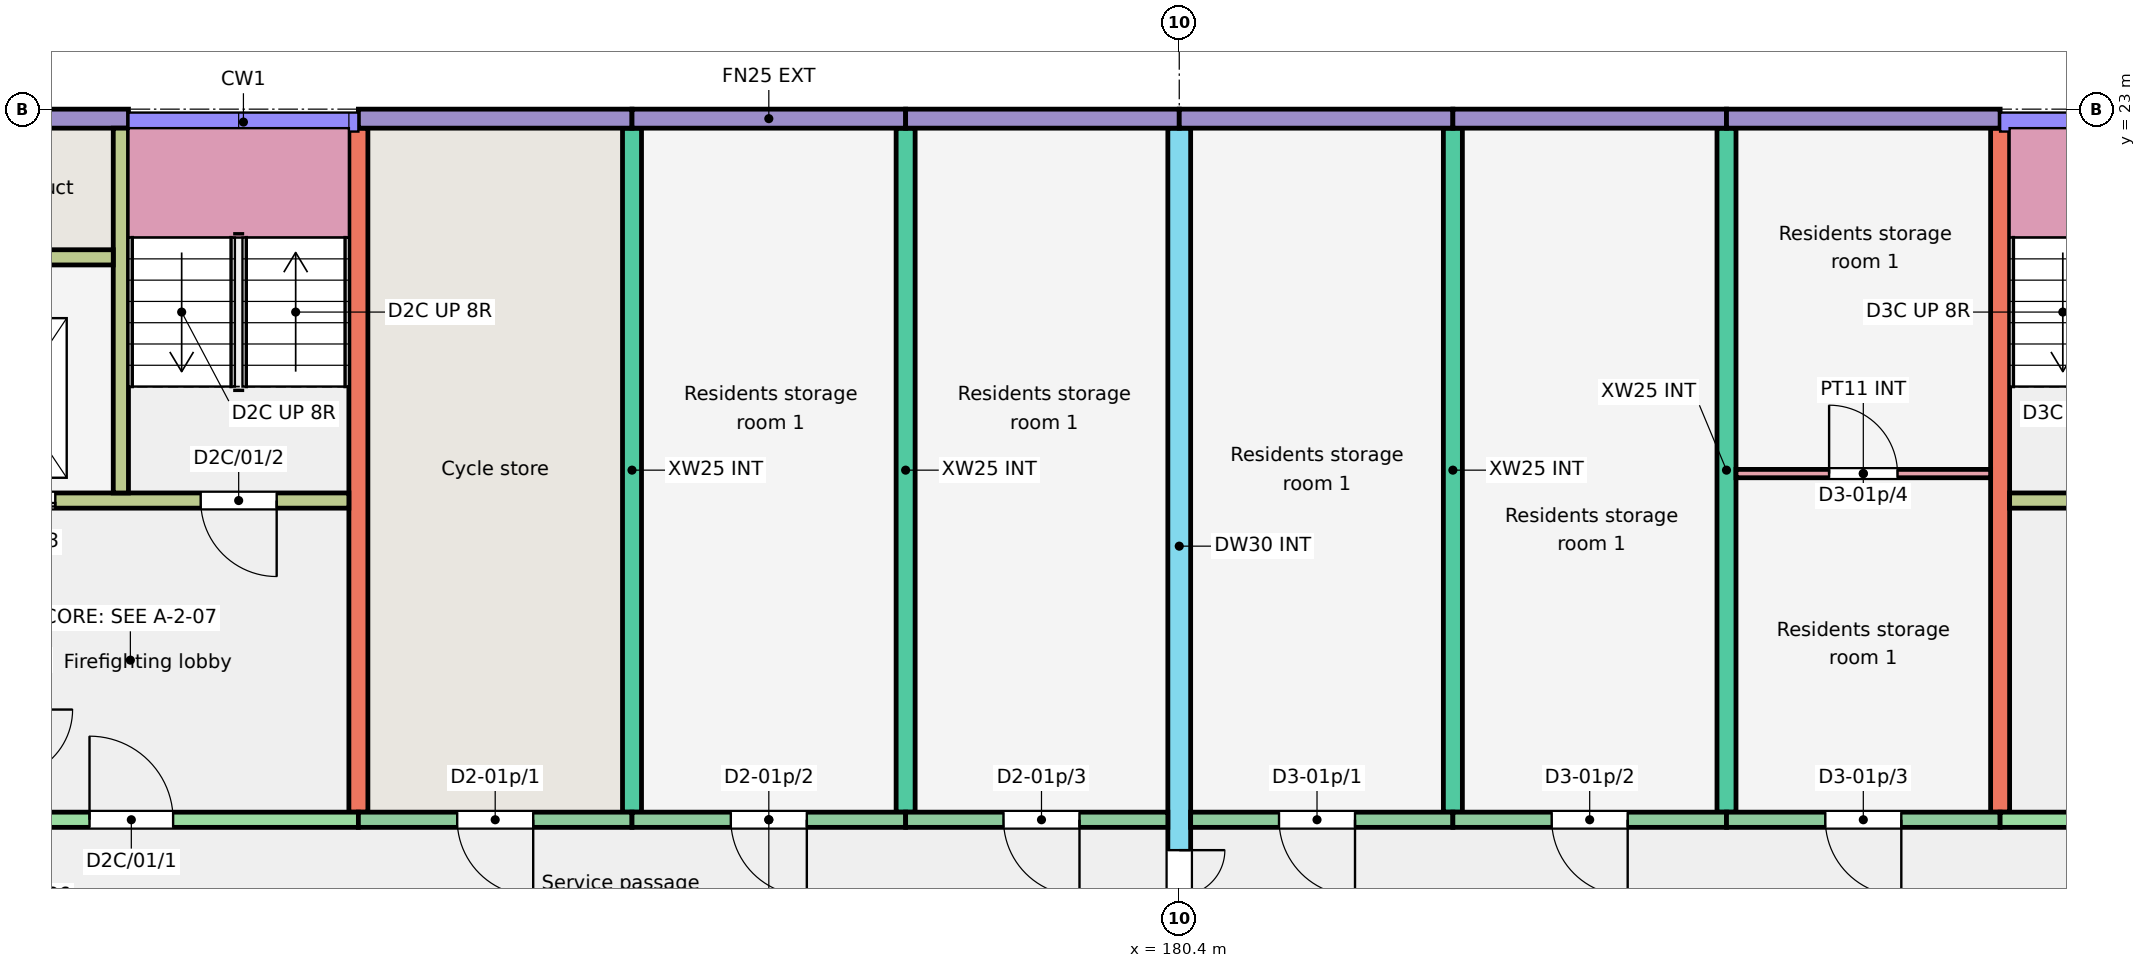
"""IFC4 building model, lengths in metres.
Left out: names, types, materials, properties, quantities, classifications, styles, units other than length and angle.
Written with IfcOpenShell. Run it as: python <this file> out.ifc"""

import sys

from ifc_helpers import new_model, si_unit, direction, frame, frame_2d, origin, place, context, subcontext, project, spatial, rectangle, extrude, element, fill, save


model = new_model("IFC4")
c1 = context("Model", 3, precision=1e-05, world=origin(), true_north=direction((0.0, 1.0)))
c2 = subcontext(c1, "Body", "Model", "MODEL_VIEW")
j1 = project(units=[si_unit("LENGTHUNIT", "METRE"), si_unit("PLANEANGLEUNIT", "RADIAN")], contexts=[c1])
p1 = place(None, origin())
s1 = spatial("IfcSite", under=j1, at=p1, CompositionType="ELEMENT")
p2 = place(p1, origin())
s2 = spatial("IfcBuilding", under=s1, at=p2, CompositionType="ELEMENT")
p3 = place(p2, frame((0.0, 0.0, 3.0)))
s3 = spatial("IfcBuildingStorey", under=s2, at=p3, CompositionType="ELEMENT", Elevation=3.0)
for number, where, z_axis, x_axis in (
    (1, (169.6, 13.75, 0.0), (0.0, 0.0, 1.0), (0.0, 1.0, 0.0)),
    (2, (173.2, 13.75, 0.0), (0.0, 0.0, 1.0), (0.0, 1.0, 0.0)),
    (3, (176.8, 13.75, 0.0), (0.0, 0.0, 1.0), (0.0, 1.0, 0.0)),
):
    element("IfcWall", number, at=place(p3, frame(where, z_axis=z_axis, x_axis=x_axis)), inside=s3, PredefinedType="SHEAR", context=c2, shape_type="SweptSolid", body=[
        extrude(rectangle(XDim=9.0, YDim=0.25, at=frame_2d((4.5, 0.0))), origin(), (0.0, 0.0, 1.0), 3.0),
    ])
p4 = place(p3, frame((180.4, 11.75, 0.0), z_axis=(0.0, 0.0, 1.0), x_axis=(0.0, 1.0, 0.0)))
e4 = element("IfcWall", 4, at=p4, inside=s3, PredefinedType="SHEAR", context=c2, shape_type="SweptSolid", body=[
    extrude(rectangle(XDim=11.0, YDim=0.3, at=frame_2d((5.5, 0.0))), origin(), (0.0, 0.0, 1.0), 3.0),
])
p5 = place(p4, frame((0.3, 0.0, 0.0)))
e5 = element("IfcOpeningElement", 5, at=p5, cuts=e4, PredefinedType="OPENING", context=c2, shape_type="SweptSolid", body=[
    extrude(rectangle(XDim=1.2, YDim=2.1, at=frame_2d((0.6, 1.05))), frame((0.0, 0.16, 0.0), z_axis=(0.0, -1.0, 0.0), x_axis=(1.0, 0.0, 0.0)), (0.0, 0.0, 1.0), 0.32),
])
for number, where, z_axis, x_axis in (
    (6, (184.0, 13.75, 0.0), (0.0, 0.0, 1.0), (0.0, 1.0, 0.0)),
    (7, (187.6, 13.75, 0.0), (0.0, 0.0, 1.0), (0.0, 1.0, 0.0)),
    (8, (191.2, 13.75, 0.0), (0.0, 0.0, 1.0), (0.0, 1.0, 0.0)),
):
    element("IfcWall", number, at=place(p3, frame(where, z_axis=z_axis, x_axis=x_axis)), inside=s3, PredefinedType="SHEAR", context=c2, shape_type="SweptSolid", body=[
        extrude(rectangle(XDim=9.0, YDim=0.25, at=frame_2d((4.5, 0.0))), origin(), (0.0, 0.0, 1.0), 3.0),
    ])
p6 = place(p3, frame((163.6, 22.875, 0.0), z_axis=(0.0, 0.0, 1.0), x_axis=(1.0, 0.0, 0.0)))
e9 = element("IfcWall", 9, at=p6, inside=s3, PredefinedType="SOLIDWALL", context=c2, shape_type="SweptSolid", body=[
    extrude(rectangle(XDim=2.975, YDim=0.25, at=frame_2d((1.487, 0.0))), origin(), (0.0, 0.0, 1.0), 3.0),
])
p7 = place(p3, frame((163.75, 13.65, 0.0), z_axis=(0.0, 0.0, 1.0), x_axis=(1.0, 0.0, 0.0)))
e10 = element("IfcWall", 10, at=p7, inside=s3, PredefinedType="SHEAR", context=c2, shape_type="SweptSolid", body=[
    extrude(rectangle(XDim=5.85, YDim=0.2, at=frame_2d((2.925, 0.0))), origin(), (0.0, 0.0, 1.0), 3.0),
])
p8 = place(p7, frame((2.312, 0.0, 0.0)))
e11 = element("IfcOpeningElement", 11, at=p8, cuts=e10, PredefinedType="OPENING", context=c2, shape_type="SweptSolid", body=[
    extrude(rectangle(XDim=1.1, YDim=2.1, at=frame_2d((0.55, 1.05))), frame((0.0, 0.11, 0.0), z_axis=(0.0, -1.0, 0.0), x_axis=(1.0, 0.0, 0.0)), (0.0, 0.0, 1.0), 0.22),
])
p9 = place(p3, frame((163.75, 17.85, 0.0), z_axis=(0.0, 0.0, 1.0), x_axis=(1.0, 0.0, 0.0)))
e12 = element("IfcWall", 12, at=p9, inside=s3, PredefinedType="SHEAR", context=c2, shape_type="SweptSolid", body=[
    extrude(rectangle(XDim=5.725, YDim=0.2, at=frame_2d((2.863, 0.0))), origin(), (0.0, 0.0, 1.0), 3.0),
])
p10 = place(p9, frame((3.775, 0.0, 0.0)))
e13 = element("IfcOpeningElement", 13, at=p10, cuts=e12, PredefinedType="OPENING", context=c2, shape_type="SweptSolid", body=[
    extrude(rectangle(XDim=1.0, YDim=2.1, at=frame_2d((0.5, 1.05))), frame((0.0, 0.11, 0.0), z_axis=(0.0, -1.0, 0.0), x_axis=(1.0, 0.0, 0.0)), (0.0, 0.0, 1.0), 0.22),
])
p11 = place(p9, frame((0.762, 0.0, 0.0)))
e14 = element("IfcOpeningElement", 14, at=p11, cuts=e12, PredefinedType="OPENING", context=c2, shape_type="SweptSolid", body=[
    extrude(rectangle(XDim=1.1, YDim=2.1, at=frame_2d((0.55, 1.05))), frame((0.0, 0.11, 0.0), z_axis=(0.0, -1.0, 0.0), x_axis=(1.0, 0.0, 0.0)), (0.0, 0.0, 1.0), 0.22),
])
p12 = place(p3, frame((166.475, 17.95, 0.0), z_axis=(0.0, 0.0, 1.0), x_axis=(0.0, 1.0, 0.0)))
e15 = element("IfcWall", 15, at=p12, inside=s3, PredefinedType="SHEAR", context=c2, shape_type="SweptSolid", body=[
    extrude(rectangle(XDim=4.8, YDim=0.2, at=frame_2d((2.4, 0.0))), origin(), (0.0, 0.0, 1.0), 3.0),
])
p13 = place(p3, frame((163.75, 21.05, 0.0), z_axis=(0.0, 0.0, 1.0), x_axis=(1.0, 0.0, 0.0)))
e16 = element("IfcWall", 16, at=p13, inside=s3, PredefinedType="SHEAR", context=c2, shape_type="SweptSolid", body=[
    extrude(rectangle(XDim=2.625, YDim=0.2, at=frame_2d((1.312, 0.0))), origin(), (0.0, 0.0, 1.0), 3.0),
])
p14 = place(p3, frame((169.6, 22.875, 0.0), z_axis=(0.0, 0.0, 1.0), x_axis=(1.0, 0.0, 0.0)))
e17 = element("IfcWall", 17, at=p14, inside=s3, PredefinedType="SOLIDWALL", context=c2, shape_type="SweptSolid", body=[
    extrude(rectangle(XDim=3.6, YDim=0.25, at=frame_2d((1.8, 0.0))), origin(), (0.0, 0.0, 1.0), 3.0),
])
p15 = place(p3, frame((169.6, 13.65, 0.0), z_axis=(0.0, 0.0, 1.0), x_axis=(1.0, 0.0, 0.0)))
e18 = element("IfcWall", 18, at=p15, inside=s3, PredefinedType="SOLIDWALL", context=c2, shape_type="SweptSolid", body=[
    extrude(rectangle(XDim=3.6, YDim=0.2, at=frame_2d((1.8, 0.0))), origin(), (0.0, 0.0, 1.0), 3.0),
])
p16 = place(p15, frame((1.3, 0.0, 0.0)))
e19 = element("IfcOpeningElement", 19, at=p16, cuts=e18, PredefinedType="OPENING", context=c2, shape_type="SweptSolid", body=[
    extrude(rectangle(XDim=1.0, YDim=2.1, at=frame_2d((0.5, 1.05))), frame((0.0, 0.11, 0.0), z_axis=(0.0, -1.0, 0.0), x_axis=(1.0, 0.0, 0.0)), (0.0, 0.0, 1.0), 0.22),
])
p17 = place(p3, frame((173.2, 22.875, 0.0), z_axis=(0.0, 0.0, 1.0), x_axis=(1.0, 0.0, 0.0)))
e20 = element("IfcWall", 20, at=p17, inside=s3, PredefinedType="SOLIDWALL", context=c2, shape_type="SweptSolid", body=[
    extrude(rectangle(XDim=3.6, YDim=0.25, at=frame_2d((1.8, 0.0))), origin(), (0.0, 0.0, 1.0), 3.0),
])
p18 = place(p3, frame((173.2, 13.65, 0.0), z_axis=(0.0, 0.0, 1.0), x_axis=(1.0, 0.0, 0.0)))
e21 = element("IfcWall", 21, at=p18, inside=s3, PredefinedType="SOLIDWALL", context=c2, shape_type="SweptSolid", body=[
    extrude(rectangle(XDim=3.6, YDim=0.2, at=frame_2d((1.8, 0.0))), origin(), (0.0, 0.0, 1.0), 3.0),
])
p19 = place(p18, frame((1.3, 0.0, 0.0)))
e22 = element("IfcOpeningElement", 22, at=p19, cuts=e21, PredefinedType="OPENING", context=c2, shape_type="SweptSolid", body=[
    extrude(rectangle(XDim=1.0, YDim=2.1, at=frame_2d((0.5, 1.05))), frame((0.0, 0.11, 0.0), z_axis=(0.0, -1.0, 0.0), x_axis=(1.0, 0.0, 0.0)), (0.0, 0.0, 1.0), 0.22),
])
p20 = place(p3, frame((176.8, 22.875, 0.0), z_axis=(0.0, 0.0, 1.0), x_axis=(1.0, 0.0, 0.0)))
e23 = element("IfcWall", 23, at=p20, inside=s3, PredefinedType="SOLIDWALL", context=c2, shape_type="SweptSolid", body=[
    extrude(rectangle(XDim=3.6, YDim=0.25, at=frame_2d((1.8, 0.0))), origin(), (0.0, 0.0, 1.0), 3.0),
])
p21 = place(p3, frame((176.8, 13.65, 0.0), z_axis=(0.0, 0.0, 1.0), x_axis=(1.0, 0.0, 0.0)))
e24 = element("IfcWall", 24, at=p21, inside=s3, PredefinedType="SOLIDWALL", context=c2, shape_type="SweptSolid", body=[
    extrude(rectangle(XDim=3.45, YDim=0.2, at=frame_2d((1.725, 0.0))), origin(), (0.0, 0.0, 1.0), 3.0),
])
p22 = place(p21, frame((1.288, 0.0, 0.0)))
e25 = element("IfcOpeningElement", 25, at=p22, cuts=e24, PredefinedType="OPENING", context=c2, shape_type="SweptSolid", body=[
    extrude(rectangle(XDim=1.0, YDim=2.1, at=frame_2d((0.5, 1.05))), frame((0.0, 0.11, 0.0), z_axis=(0.0, -1.0, 0.0), x_axis=(1.0, 0.0, 0.0)), (0.0, 0.0, 1.0), 0.22),
])
p23 = place(p3, frame((180.4, 22.875, 0.0), z_axis=(0.0, 0.0, 1.0), x_axis=(1.0, 0.0, 0.0)))
e26 = element("IfcWall", 26, at=p23, inside=s3, PredefinedType="SOLIDWALL", context=c2, shape_type="SweptSolid", body=[
    extrude(rectangle(XDim=3.6, YDim=0.25, at=frame_2d((1.8, 0.0))), origin(), (0.0, 0.0, 1.0), 3.0),
])
p24 = place(p3, frame((180.55, 13.65, 0.0), z_axis=(0.0, 0.0, 1.0), x_axis=(1.0, 0.0, 0.0)))
e27 = element("IfcWall", 27, at=p24, inside=s3, PredefinedType="SOLIDWALL", context=c2, shape_type="SweptSolid", body=[
    extrude(rectangle(XDim=3.45, YDim=0.2, at=frame_2d((1.725, 0.0))), origin(), (0.0, 0.0, 1.0), 3.0),
])
p25 = place(p24, frame((1.163, 0.0, 0.0)))
e28 = element("IfcOpeningElement", 28, at=p25, cuts=e27, PredefinedType="OPENING", context=c2, shape_type="SweptSolid", body=[
    extrude(rectangle(XDim=1.0, YDim=2.1, at=frame_2d((0.5, 1.05))), frame((0.0, 0.11, 0.0), z_axis=(0.0, -1.0, 0.0), x_axis=(1.0, 0.0, 0.0)), (0.0, 0.0, 1.0), 0.22),
])
p26 = place(p3, frame((184.0, 22.875, 0.0), z_axis=(0.0, 0.0, 1.0), x_axis=(1.0, 0.0, 0.0)))
e29 = element("IfcWall", 29, at=p26, inside=s3, PredefinedType="SOLIDWALL", context=c2, shape_type="SweptSolid", body=[
    extrude(rectangle(XDim=3.6, YDim=0.25, at=frame_2d((1.8, 0.0))), origin(), (0.0, 0.0, 1.0), 3.0),
])
p27 = place(p3, frame((184.0, 13.65, 0.0), z_axis=(0.0, 0.0, 1.0), x_axis=(1.0, 0.0, 0.0)))
e30 = element("IfcWall", 30, at=p27, inside=s3, PredefinedType="SOLIDWALL", context=c2, shape_type="SweptSolid", body=[
    extrude(rectangle(XDim=3.6, YDim=0.2, at=frame_2d((1.8, 0.0))), origin(), (0.0, 0.0, 1.0), 3.0),
])
p28 = place(p27, frame((1.3, 0.0, 0.0)))
e31 = element("IfcOpeningElement", 31, at=p28, cuts=e30, PredefinedType="OPENING", context=c2, shape_type="SweptSolid", body=[
    extrude(rectangle(XDim=1.0, YDim=2.1, at=frame_2d((0.5, 1.05))), frame((0.0, 0.11, 0.0), z_axis=(0.0, -1.0, 0.0), x_axis=(1.0, 0.0, 0.0)), (0.0, 0.0, 1.0), 0.22),
])
p29 = place(p3, frame((187.6, 22.875, 0.0), z_axis=(0.0, 0.0, 1.0), x_axis=(1.0, 0.0, 0.0)))
e32 = element("IfcWall", 32, at=p29, inside=s3, PredefinedType="SOLIDWALL", context=c2, shape_type="SweptSolid", body=[
    extrude(rectangle(XDim=3.6, YDim=0.25, at=frame_2d((1.8, 0.0))), origin(), (0.0, 0.0, 1.0), 3.0),
])
p30 = place(p3, frame((187.6, 13.65, 0.0), z_axis=(0.0, 0.0, 1.0), x_axis=(1.0, 0.0, 0.0)))
e33 = element("IfcWall", 33, at=p30, inside=s3, PredefinedType="SOLIDWALL", context=c2, shape_type="SweptSolid", body=[
    extrude(rectangle(XDim=3.6, YDim=0.2, at=frame_2d((1.8, 0.0))), origin(), (0.0, 0.0, 1.0), 3.0),
])
p31 = place(p30, frame((1.3, 0.0, 0.0)))
e34 = element("IfcOpeningElement", 34, at=p31, cuts=e33, PredefinedType="OPENING", context=c2, shape_type="SweptSolid", body=[
    extrude(rectangle(XDim=1.0, YDim=2.1, at=frame_2d((0.5, 1.05))), frame((0.0, 0.11, 0.0), z_axis=(0.0, -1.0, 0.0), x_axis=(1.0, 0.0, 0.0)), (0.0, 0.0, 1.0), 0.22),
])
p32 = place(p3, frame((191.2, 13.65, 0.0), z_axis=(0.0, 0.0, 1.0), x_axis=(1.0, 0.0, 0.0)))
e35 = element("IfcWall", 35, at=p32, inside=s3, PredefinedType="SHEAR", context=c2, shape_type="SweptSolid", body=[
    extrude(rectangle(XDim=5.85, YDim=0.2, at=frame_2d((2.925, 0.0))), origin(), (0.0, 0.0, 1.0), 3.0),
])
p33 = place(p32, frame((2.438, 0.0, 0.0)))
e36 = element("IfcOpeningElement", 36, at=p33, cuts=e35, PredefinedType="OPENING", context=c2, shape_type="SweptSolid", body=[
    extrude(rectangle(XDim=1.1, YDim=2.1, at=frame_2d((0.55, 1.05))), frame((0.0, 0.11, 0.0), z_axis=(0.0, -1.0, 0.0), x_axis=(1.0, 0.0, 0.0)), (0.0, 0.0, 1.0), 0.22),
])
p34 = place(p3, frame((191.325, 17.85, 0.0), z_axis=(0.0, 0.0, 1.0), x_axis=(1.0, 0.0, 0.0)))
e37 = element("IfcWall", 37, at=p34, inside=s3, PredefinedType="SHEAR", context=c2, shape_type="SweptSolid", body=[
    extrude(rectangle(XDim=5.725, YDim=0.2, at=frame_2d((2.863, 0.0))), origin(), (0.0, 0.0, 1.0), 3.0),
])
p35 = place(p34, frame((0.95, 0.0, 0.0)))
e38 = element("IfcOpeningElement", 38, at=p35, cuts=e37, PredefinedType="OPENING", context=c2, shape_type="SweptSolid", body=[
    extrude(rectangle(XDim=1.0, YDim=2.1, at=frame_2d((0.5, 1.05))), frame((0.0, 0.11, 0.0), z_axis=(0.0, -1.0, 0.0), x_axis=(1.0, 0.0, 0.0)), (0.0, 0.0, 1.0), 0.22),
])
p36 = place(p34, frame((3.863, 0.0, 0.0)))
e39 = element("IfcOpeningElement", 39, at=p36, cuts=e37, PredefinedType="OPENING", context=c2, shape_type="SweptSolid", body=[
    extrude(rectangle(XDim=1.1, YDim=2.1, at=frame_2d((0.55, 1.05))), frame((0.0, 0.11, 0.0), z_axis=(0.0, -1.0, 0.0), x_axis=(1.0, 0.0, 0.0)), (0.0, 0.0, 1.0), 0.22),
])
p37 = place(p3, frame((187.725, 18.205, 0.0), z_axis=(0.0, 0.0, 1.0), x_axis=(1.0, 0.0, 0.0)))
e40 = element("IfcWall", 40, at=p37, inside=s3, PredefinedType="PARTITIONING", context=c2, shape_type="SweptSolid", body=[
    extrude(rectangle(XDim=3.35, YDim=0.11, at=frame_2d((1.675, 0.0))), origin(), (0.0, 0.0, 1.0), 2.8),
])
p38 = place(p37, frame((1.225, 0.0, 0.0)))
e41 = element("IfcOpeningElement", 41, at=p38, cuts=e40, PredefinedType="OPENING", context=c2, shape_type="SweptSolid", body=[
    extrude(rectangle(XDim=0.9, YDim=2.1, at=frame_2d((0.45, 1.05))), frame((0.0, 0.065, 0.0), z_axis=(0.0, -1.0, 0.0), x_axis=(1.0, 0.0, 0.0)), (0.0, 0.0, 1.0), 0.13),
])
p39 = place(p16, origin())
e42 = element("IfcDoor", 42, at=p39, inside=s3, OperationType="SINGLE_SWING_RIGHT", PredefinedType="DOOR", context=c2, shape_type="SweptSolid", body=[
    extrude(rectangle(XDim=1.0, YDim=2.1, at=frame_2d((0.5, 1.05))), frame((0.0, 0.025, 0.0), z_axis=(0.0, -1.0, 0.0), x_axis=(1.0, 0.0, 0.0)), (0.0, 0.0, 1.0), 0.05),
])
fill(e19, e42)
p40 = place(p19, origin())
e43 = element("IfcDoor", 43, at=p40, inside=s3, OperationType="SINGLE_SWING_RIGHT", PredefinedType="DOOR", context=c2, shape_type="SweptSolid", body=[
    extrude(rectangle(XDim=1.0, YDim=2.1, at=frame_2d((0.5, 1.05))), frame((0.0, 0.025, 0.0), z_axis=(0.0, -1.0, 0.0), x_axis=(1.0, 0.0, 0.0)), (0.0, 0.0, 1.0), 0.05),
])
fill(e22, e43)
p41 = place(p22, origin())
e44 = element("IfcDoor", 44, at=p41, inside=s3, OperationType="SINGLE_SWING_RIGHT", PredefinedType="DOOR", context=c2, shape_type="SweptSolid", body=[
    extrude(rectangle(XDim=1.0, YDim=2.1, at=frame_2d((0.5, 1.05))), frame((0.0, 0.025, 0.0), z_axis=(0.0, -1.0, 0.0), x_axis=(1.0, 0.0, 0.0)), (0.0, 0.0, 1.0), 0.05),
])
fill(e25, e44)
p42 = place(p25, origin())
e45 = element("IfcDoor", 45, at=p42, inside=s3, OperationType="SINGLE_SWING_RIGHT", PredefinedType="DOOR", context=c2, shape_type="SweptSolid", body=[
    extrude(rectangle(XDim=1.0, YDim=2.1, at=frame_2d((0.5, 1.05))), frame((0.0, 0.025, 0.0), z_axis=(0.0, -1.0, 0.0), x_axis=(1.0, 0.0, 0.0)), (0.0, 0.0, 1.0), 0.05),
])
fill(e28, e45)
p43 = place(p28, origin())
e46 = element("IfcDoor", 46, at=p43, inside=s3, OperationType="SINGLE_SWING_RIGHT", PredefinedType="DOOR", context=c2, shape_type="SweptSolid", body=[
    extrude(rectangle(XDim=1.0, YDim=2.1, at=frame_2d((0.5, 1.05))), frame((0.0, 0.025, 0.0), z_axis=(0.0, -1.0, 0.0), x_axis=(1.0, 0.0, 0.0)), (0.0, 0.0, 1.0), 0.05),
])
fill(e31, e46)
p44 = place(p31, origin())
e47 = element("IfcDoor", 47, at=p44, inside=s3, OperationType="SINGLE_SWING_RIGHT", PredefinedType="DOOR", context=c2, shape_type="SweptSolid", body=[
    extrude(rectangle(XDim=1.0, YDim=2.1, at=frame_2d((0.5, 1.05))), frame((0.0, 0.025, 0.0), z_axis=(0.0, -1.0, 0.0), x_axis=(1.0, 0.0, 0.0)), (0.0, 0.0, 1.0), 0.05),
])
fill(e34, e47)
p45 = place(p38, origin())
e48 = element("IfcDoor", 48, at=p45, inside=s3, OperationType="SINGLE_SWING_LEFT", PredefinedType="DOOR", context=c2, shape_type="SweptSolid", body=[
    extrude(rectangle(XDim=0.9, YDim=2.1, at=frame_2d((0.45, 1.05))), frame((0.0, 0.025, 0.0), z_axis=(0.0, -1.0, 0.0), x_axis=(1.0, 0.0, 0.0)), (0.0, 0.0, 1.0), 0.05),
])
fill(e41, e48)
p46 = place(p8, origin())
e49 = element("IfcDoor", 49, at=p46, inside=s3, OperationType="SINGLE_SWING_LEFT", PredefinedType="DOOR", context=c2, shape_type="SweptSolid", body=[
    extrude(rectangle(XDim=1.1, YDim=2.1, at=frame_2d((0.55, 1.05))), frame((0.0, 0.025, 0.0), z_axis=(0.0, -1.0, 0.0), x_axis=(1.0, 0.0, 0.0)), (0.0, 0.0, 1.0), 0.05),
])
fill(e11, e49)
p47 = place(p10, origin())
e50 = element("IfcDoor", 50, at=p47, inside=s3, OperationType="SINGLE_SWING_RIGHT", PredefinedType="DOOR", context=c2, shape_type="SweptSolid", body=[
    extrude(rectangle(XDim=1.0, YDim=2.1, at=frame_2d((0.5, 1.05))), frame((0.0, 0.025, 0.0), z_axis=(0.0, -1.0, 0.0), x_axis=(1.0, 0.0, 0.0)), (0.0, 0.0, 1.0), 0.05),
])
fill(e13, e50)
p48 = place(p11, origin())
e51 = element("IfcDoor", 51, at=p48, inside=s3, OperationType="DOUBLE_DOOR_SLIDING", PredefinedType="DOOR", context=c2, shape_type="SweptSolid", body=[
    extrude(rectangle(XDim=1.1, YDim=2.1, at=frame_2d((0.55, 1.05))), frame((0.0, 0.025, 0.0), z_axis=(0.0, -1.0, 0.0), x_axis=(1.0, 0.0, 0.0)), (0.0, 0.0, 1.0), 0.05),
])
fill(e14, e51)
p49 = place(p5, origin())
e52 = element("IfcDoor", 52, at=p49, inside=s3, OperationType="DOUBLE_DOOR_SINGLE_SWING", PredefinedType="DOOR", context=c2, shape_type="SweptSolid", body=[
    extrude(rectangle(XDim=1.2, YDim=2.1, at=frame_2d((0.6, 1.05))), frame((0.0, 0.025, 0.0), z_axis=(0.0, -1.0, 0.0), x_axis=(1.0, 0.0, 0.0)), (0.0, 0.0, 1.0), 0.05),
])
fill(e5, e52)
save(model, sys.argv[1])
